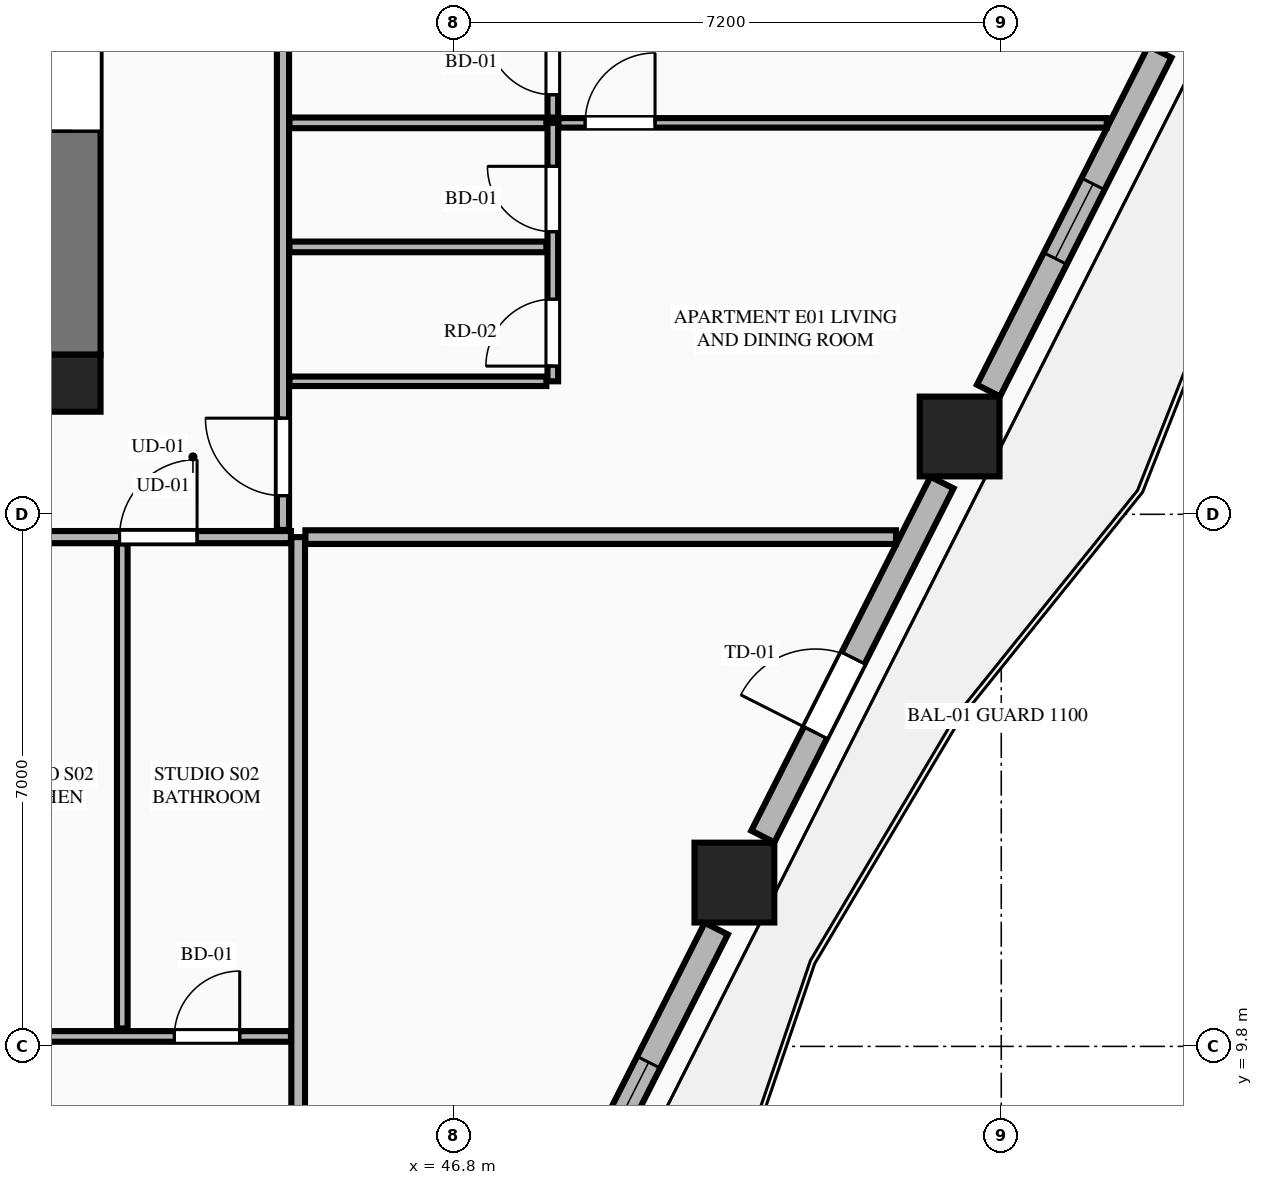
"""IFC4 building model, lengths in metres.
Left out: names, types, materials, properties, quantities, classifications, styles, units other than length and angle.
Written with IfcOpenShell. Run it as: python <this file> out.ifc"""

import sys

from ifc_helpers import new_model, si_unit, direction, frame, frame_2d, origin, origin_2d, place, context, subcontext, project, spatial, rectangle, extrude, element, fill, save


model = new_model("IFC4")
c1 = context("Model", 3, precision=1e-05, world=origin(), true_north=direction((0.0, 1.0)))
c2 = subcontext(c1, "Body", "Model", "MODEL_VIEW")
j1 = project(units=[si_unit("LENGTHUNIT", "METRE"), si_unit("PLANEANGLEUNIT", "RADIAN")], contexts=[c1])
p1 = place(None, origin())
s1 = spatial("IfcSite", under=j1, at=p1, CompositionType="ELEMENT")
p2 = place(p1, origin())
s2 = spatial("IfcBuilding", under=s1, at=p2, CompositionType="ELEMENT")
p3 = place(p2, frame((0.0, 0.0, 101.95)))
s3 = spatial("IfcBuildingStorey", under=s2, at=p3, CompositionType="ELEMENT", Elevation=101.95)
p4 = place(p3, frame((41.775, 18.525, 0.0), z_axis=(0.0, 0.0, 1.0), x_axis=(1.0, 0.0, 0.0)))
e1 = element("IfcColumn", 1, at=p4, inside=s3, PredefinedType="COLUMN", context=c2, shape_type="SweptSolid", body=[
    extrude(rectangle(XDim=0.75, YDim=0.75, at=origin_2d()), origin(), (0.0, 0.0, 1.0), 3.55),
])
p5 = place(p3, frame((41.775, 18.9, 0.0), z_axis=(0.0, 0.0, 1.0), x_axis=(0.0, 1.0, 0.0)))
e2 = element("IfcWall", 2, at=p5, inside=s3, PredefinedType="SHEAR", context=c2, shape_type="SweptSolid", body=[
    extrude(rectangle(XDim=14.0, YDim=0.75, at=frame_2d((7.0, 0.0))), origin(), (0.0, 0.0, 1.0), 3.34),
])
p6 = place(p5, frame((2.94, 0.0, 0.0)))
e3 = element("IfcOpeningElement", 3, at=p6, cuts=e2, PredefinedType="OPENING", context=c2, shape_type="SweptSolid", body=[
    extrude(rectangle(XDim=1.22, YDim=2.25, at=frame_2d((0.61, 1.125))), frame((0.0, 0.385, 0.0), z_axis=(0.0, -1.0, 0.0), x_axis=(1.0, 0.0, 0.0)), (0.0, 0.0, 1.0), 0.77),
])
for number, where, z_axis, x_axis in (
    (4, (50.489, 11.955, 0.0), (0.0, 0.0, 1.0), (1.0, 0.0, 0.0)),
    (5, (53.452, 17.824, 0.0), (0.0, 0.0, 1.0), (1.0, 0.0, 0.0)),
):
    element("IfcColumn", number, at=place(p3, frame(where, z_axis=z_axis, x_axis=x_axis)), inside=s3, PredefinedType="COLUMN", context=c2, shape_type="SweptSolid", body=[
        extrude(rectangle(XDim=1.05, YDim=1.05, at=origin_2d()), origin(), (0.0, 0.0, 1.0), 3.55),
    ])
p7 = place(p3, frame((47.975, 6.852, 0.0), z_axis=(0.0, 0.0, 1.0), x_axis=(0.451548465867, 0.892246593142, 0.0)))
e6 = element("IfcWall", 6, at=p7, inside=s3, PredefinedType="STANDARD", context=c2, shape_type="SweptSolid", body=[
    extrude(rectangle(XDim=5.04, YDim=0.34, at=frame_2d((2.52, 0.0))), origin(), (0.0, 0.0, 1.0), 2.797),
])
p8 = place(p7, frame((1.97, 0.0, 0.75)))
e7 = element("IfcOpeningElement", 7, at=p8, cuts=e6, PredefinedType="OPENING", context=c2, shape_type="SweptSolid", body=[
    extrude(rectangle(XDim=1.1, YDim=1.897, at=frame_2d((0.55, 0.948))), frame((0.0, 0.18, 0.0), z_axis=(0.0, -1.0, 0.0), x_axis=(1.0, 0.0, 0.0)), (0.0, 0.0, 1.0), 0.36),
])
p9 = place(p3, frame((50.863, 12.561, 0.0), z_axis=(0.0, 0.0, 1.0), x_axis=(0.451567731634, 0.892236842855, 0.0)))
e8 = element("IfcWall", 8, at=p9, inside=s3, PredefinedType="STANDARD", context=c2, shape_type="SweptSolid", body=[
    extrude(rectangle(XDim=5.219, YDim=0.34, at=frame_2d((2.61, 0.0))), origin(), (0.0, 0.0, 1.0), 2.797),
])
p10 = place(p9, frame((1.532, 0.0, 0.0)))
e9 = element("IfcOpeningElement", 9, at=p10, cuts=e8, PredefinedType="OPENING", context=c2, shape_type="SweptSolid", body=[
    extrude(rectangle(XDim=1.1, YDim=2.25, at=frame_2d((0.55, 1.125))), frame((0.0, 0.18, 0.0), z_axis=(0.0, -1.0, 0.0), x_axis=(1.0, 0.0, 0.0)), (0.0, 0.0, 1.0), 0.36),
])
p11 = place(p3, frame((53.832, 18.428, 0.0), z_axis=(0.0, 0.0, 1.0), x_axis=(0.451431617681, 0.892305718102, 0.0)))
e10 = element("IfcWall", 10, at=p11, inside=s3, PredefinedType="STANDARD", context=c2, shape_type="SweptSolid", body=[
    extrude(rectangle(XDim=4.995, YDim=0.34, at=frame_2d((2.498, 0.0))), origin(), (0.0, 0.0, 1.0), 2.797),
])
p12 = place(p11, frame((1.947, 0.0, 0.75)))
e11 = element("IfcOpeningElement", 11, at=p12, cuts=e10, PredefinedType="OPENING", context=c2, shape_type="SweptSolid", body=[
    extrude(rectangle(XDim=1.1, YDim=1.897, at=frame_2d((0.55, 0.948))), frame((0.0, 0.18, 0.0), z_axis=(0.0, -1.0, 0.0), x_axis=(1.0, 0.0, 0.0)), (0.0, 0.0, 1.0), 0.36),
])
p13 = place(p3, frame((44.75, 4.105, 0.0), z_axis=(0.0, 0.0, 1.0), x_axis=(0.0, 1.0, 0.0)))
e12 = element("IfcWall", 12, at=p13, inside=s3, PredefinedType="PARTITIONING", context=c2, shape_type="SweptSolid", body=[
    extrude(rectangle(XDim=12.395, YDim=0.18, at=frame_2d((6.198, 0.0))), origin(), (0.0, 0.0, 1.0), 3.34),
])
p14 = place(p3, frame((36.327, 16.5, 0.0), z_axis=(0.0, 0.0, 1.0), x_axis=(1.0, 0.0, 0.0)))
e13 = element("IfcWall", 13, at=p14, inside=s3, PredefinedType="PARTITIONING", context=c2, shape_type="SweptSolid", body=[
    extrude(rectangle(XDim=8.328, YDim=0.16, at=frame_2d((4.164, 0.0))), origin(), (0.0, 0.0, 1.0), 3.34),
])
p15 = place(p14, frame((6.073, 0.0, 0.0)))
e14 = element("IfcOpeningElement", 14, at=p15, cuts=e13, PredefinedType="OPENING", context=c2, shape_type="SweptSolid", body=[
    extrude(rectangle(XDim=1.02, YDim=2.25, at=frame_2d((0.51, 1.125))), frame((0.0, 0.09, 0.0), z_axis=(0.0, -1.0, 0.0), x_axis=(1.0, 0.0, 0.0)), (0.0, 0.0, 1.0), 0.18),
])
p16 = place(p3, frame((40.3, 9.931, 0.0), z_axis=(0.0, 0.0, 1.0), x_axis=(1.0, 0.0, 0.0)))
e15 = element("IfcWall", 15, at=p16, inside=s3, PredefinedType="PLUMBINGWALL", context=c2, shape_type="SweptSolid", body=[
    extrude(rectangle(XDim=4.355, YDim=0.14, at=frame_2d((2.177, 0.0))), origin(), (0.0, 0.0, 1.0), 3.34),
])
p17 = place(p16, frame((2.821, 0.0, 0.0)))
e16 = element("IfcOpeningElement", 16, at=p17, cuts=e15, PredefinedType="OPENING", context=c2, shape_type="SweptSolid", body=[
    extrude(rectangle(XDim=0.86, YDim=2.1, at=frame_2d((0.43, 1.05))), frame((0.0, 0.08, 0.0), z_axis=(0.0, -1.0, 0.0), x_axis=(1.0, 0.0, 0.0)), (0.0, 0.0, 1.0), 0.16),
])
p18 = place(p16, frame((0.22, 0.0, 0.0)))
e17 = element("IfcOpeningElement", 17, at=p18, cuts=e15, PredefinedType="OPENING", context=c2, shape_type="SweptSolid", body=[
    extrude(rectangle(XDim=0.88, YDim=2.15, at=frame_2d((0.44, 1.075))), frame((0.0, 0.08, 0.0), z_axis=(0.0, -1.0, 0.0), x_axis=(1.0, 0.0, 0.0)), (0.0, 0.0, 1.0), 0.16),
])
p19 = place(p3, frame((42.436, 10.036, 0.0), z_axis=(0.0, 0.0, 1.0), x_axis=(0.0, 1.0, 0.0)))
e18 = element("IfcWall", 18, at=p19, inside=s3, PredefinedType="PLUMBINGWALL", context=c2, shape_type="SweptSolid", body=[
    extrude(rectangle(XDim=6.379, YDim=0.14, at=frame_2d((3.189, 0.0))), origin(), (0.0, 0.0, 1.0), 2.722),
])
p20 = place(p3, frame((44.845, 16.5, 0.0), z_axis=(0.0, 0.0, 1.0), x_axis=(1.0, 0.0, 0.0)))
e19 = element("IfcWall", 19, at=p20, inside=s3, PredefinedType="PARTITIONING", context=c2, shape_type="SweptSolid", body=[
    extrude(rectangle(XDim=7.77, YDim=0.18, at=frame_2d((3.885, 0.0))), origin(), (0.0, 0.0, 1.0), 3.34),
])
p21 = place(p3, frame((44.55, 16.595, 0.0), z_axis=(0.0, 0.0, 1.0), x_axis=(0.0, 1.0, 0.0)))
e20 = element("IfcWall", 20, at=p21, inside=s3, PredefinedType="PARTITIONING", context=c2, shape_type="SweptSolid", body=[
    extrude(rectangle(XDim=9.586, YDim=0.16, at=frame_2d((4.793, 0.0))), origin(), (0.0, 0.0, 1.0), 3.34),
])
p22 = place(p21, frame((0.45, 0.0, 0.0)))
e21 = element("IfcOpeningElement", 21, at=p22, cuts=e20, PredefinedType="OPENING", context=c2, shape_type="SweptSolid", body=[
    extrude(rectangle(XDim=1.02, YDim=2.25, at=frame_2d((0.51, 1.125))), frame((0.0, 0.09, 0.0), z_axis=(0.0, -1.0, 0.0), x_axis=(1.0, 0.0, 0.0)), (0.0, 0.0, 1.0), 0.18),
])
p23 = place(p3, frame((44.635, 18.55, 0.0), z_axis=(0.0, 0.0, 1.0), x_axis=(1.0, 0.0, 0.0)))
e22 = element("IfcWall", 22, at=p23, inside=s3, PredefinedType="PARTITIONING", context=c2, shape_type="SweptSolid", body=[
    extrude(rectangle(XDim=3.38, YDim=0.125, at=frame_2d((1.69, 0.0))), origin(), (0.0, 0.0, 1.0), 2.722),
])
p24 = place(p3, frame((48.1, 18.55, 0.0), z_axis=(0.0, 0.0, 1.0), x_axis=(0.0, 1.0, 0.0)))
e23 = element("IfcWall", 23, at=p24, inside=s3, PredefinedType="PLUMBINGWALL", context=c2, shape_type="SweptSolid", body=[
    extrude(rectangle(XDim=3.4, YDim=0.14, at=frame_2d((1.7, 0.0))), origin(), (0.0, 0.0, 1.0), 3.34),
])
p25 = place(p24, frame((0.2, 0.0, 0.0)))
e24 = element("IfcOpeningElement", 24, at=p25, cuts=e23, PredefinedType="OPENING", context=c2, shape_type="SweptSolid", body=[
    extrude(rectangle(XDim=0.88, YDim=2.15, at=frame_2d((0.44, 1.075))), frame((0.0, 0.08, 0.0), z_axis=(0.0, -1.0, 0.0), x_axis=(1.0, 0.0, 0.0)), (0.0, 0.0, 1.0), 0.16),
])
p26 = place(p24, frame((1.968, 0.0, 0.0)))
e25 = element("IfcOpeningElement", 25, at=p26, cuts=e23, PredefinedType="OPENING", context=c2, shape_type="SweptSolid", body=[
    extrude(rectangle(XDim=0.86, YDim=2.1, at=frame_2d((0.43, 1.05))), frame((0.0, 0.08, 0.0), z_axis=(0.0, -1.0, 0.0), x_axis=(1.0, 0.0, 0.0)), (0.0, 0.0, 1.0), 0.16),
])
p27 = place(p3, frame((48.1, 22.02, 0.0), z_axis=(0.0, 0.0, 1.0), x_axis=(0.0, 1.0, 0.0)))
e26 = element("IfcWall", 26, at=p27, inside=s3, PredefinedType="PLUMBINGWALL", context=c2, shape_type="SweptSolid", body=[
    extrude(rectangle(XDim=4.161, YDim=0.14, at=frame_2d((2.081, 0.0))), origin(), (0.0, 0.0, 1.0), 3.34),
])
p28 = place(p27, frame((0.3, 0.0, 0.0)))
e27 = element("IfcOpeningElement", 27, at=p28, cuts=e26, PredefinedType="OPENING", context=c2, shape_type="SweptSolid", body=[
    extrude(rectangle(XDim=0.86, YDim=2.1, at=frame_2d((0.43, 1.05))), frame((0.0, 0.08, 0.0), z_axis=(0.0, -1.0, 0.0), x_axis=(1.0, 0.0, 0.0)), (0.0, 0.0, 1.0), 0.16),
])
p29 = place(p3, frame((44.635, 21.95, 0.0), z_axis=(0.0, 0.0, 1.0), x_axis=(1.0, 0.0, 0.0)))
e28 = element("IfcWall", 28, at=p29, inside=s3, PredefinedType="PLUMBINGWALL", context=c2, shape_type="SweptSolid", body=[
    extrude(rectangle(XDim=3.38, YDim=0.14, at=frame_2d((1.69, 0.0))), origin(), (0.0, 0.0, 1.0), 3.34),
])
p30 = place(p3, frame((48.175, 21.95, 0.0), z_axis=(0.0, 0.0, 1.0), x_axis=(1.0, 0.0, 0.0)))
e29 = element("IfcWall", 29, at=p30, inside=s3, PredefinedType="PARTITIONING", context=c2, shape_type="SweptSolid", body=[
    extrude(rectangle(XDim=7.213, YDim=0.125, at=frame_2d((3.606, 0.0))), origin(), (0.0, 0.0, 1.0), 3.34),
])
p31 = place(p30, frame((0.35, 0.0, 0.0)))
e30 = element("IfcOpeningElement", 30, at=p31, cuts=e29, PredefinedType="OPENING", context=c2, shape_type="SweptSolid", body=[
    extrude(rectangle(XDim=0.92, YDim=2.15, at=frame_2d((0.46, 1.075))), frame((0.0, 0.073, 0.0), z_axis=(0.0, -1.0, 0.0), x_axis=(1.0, 0.0, 0.0)), (0.0, 0.0, 1.0), 0.145),
])
p32 = place(p3, frame((44.635, 20.318, 0.0), z_axis=(0.0, 0.0, 1.0), x_axis=(1.0, 0.0, 0.0)))
e31 = element("IfcWall", 31, at=p32, inside=s3, PredefinedType="PLUMBINGWALL", context=c2, shape_type="SweptSolid", body=[
    extrude(rectangle(XDim=3.38, YDim=0.14, at=frame_2d((1.69, 0.0))), origin(), (0.0, 0.0, 1.0), 3.34),
])
p33 = place(p6, origin())
e32 = element("IfcDoor", 32, at=p33, inside=s3, OperationType="SINGLE_SWING_LEFT", PredefinedType="DOOR", context=c2, shape_type="SweptSolid", body=[
    extrude(rectangle(XDim=1.22, YDim=2.25, at=frame_2d((0.61, 1.125))), frame((0.0, 0.025, 0.0), z_axis=(0.0, -1.0, 0.0), x_axis=(1.0, 0.0, 0.0)), (0.0, 0.0, 1.0), 0.05),
])
fill(e3, e32)
p34 = place(p8, origin())
e33 = element("IfcWindow", 33, at=p34, inside=s3, PartitioningType="SINGLE_PANEL", PredefinedType="WINDOW", context=c2, shape_type="SweptSolid", body=[
    extrude(rectangle(XDim=1.1, YDim=1.897, at=frame_2d((0.55, 0.948))), frame((0.0, 0.03, 0.0), z_axis=(0.0, -1.0, 0.0), x_axis=(1.0, 0.0, 0.0)), (0.0, 0.0, 1.0), 0.06),
])
fill(e7, e33)
p35 = place(p10, origin())
e34 = element("IfcDoor", 34, at=p35, inside=s3, OperationType="SINGLE_SWING_LEFT", PredefinedType="DOOR", context=c2, shape_type="SweptSolid", body=[
    extrude(rectangle(XDim=1.1, YDim=2.25, at=frame_2d((0.55, 1.125))), frame((0.0, 0.025, 0.0), z_axis=(0.0, -1.0, 0.0), x_axis=(1.0, 0.0, 0.0)), (0.0, 0.0, 1.0), 0.05),
])
fill(e9, e34)
p36 = place(p12, origin())
e35 = element("IfcWindow", 35, at=p36, inside=s3, PartitioningType="SINGLE_PANEL", PredefinedType="WINDOW", context=c2, shape_type="SweptSolid", body=[
    extrude(rectangle(XDim=1.1, YDim=1.897, at=frame_2d((0.55, 0.948))), frame((0.0, 0.03, 0.0), z_axis=(0.0, -1.0, 0.0), x_axis=(1.0, 0.0, 0.0)), (0.0, 0.0, 1.0), 0.06),
])
fill(e11, e35)
p37 = place(p17, origin())
e36 = element("IfcDoor", 36, at=p37, inside=s3, OperationType="SINGLE_SWING_RIGHT", PredefinedType="DOOR", context=c2, shape_type="SweptSolid", body=[
    extrude(rectangle(XDim=0.86, YDim=2.1, at=frame_2d((0.43, 1.05))), frame((0.0, 0.025, 0.0), z_axis=(0.0, -1.0, 0.0), x_axis=(1.0, 0.0, 0.0)), (0.0, 0.0, 1.0), 0.05),
])
fill(e16, e36)
p38 = place(p15, origin())
e37 = element("IfcDoor", 37, at=p38, inside=s3, OperationType="SINGLE_SWING_RIGHT", PredefinedType="DOOR", context=c2, shape_type="SweptSolid", body=[
    extrude(rectangle(XDim=1.02, YDim=2.25, at=frame_2d((0.51, 1.125))), frame((0.0, 0.025, 0.0), z_axis=(0.0, -1.0, 0.0), x_axis=(1.0, 0.0, 0.0)), (0.0, 0.0, 1.0), 0.05),
])
fill(e14, e37)
p39 = place(p25, origin())
e38 = element("IfcDoor", 38, at=p39, inside=s3, OperationType="SINGLE_SWING_LEFT", PredefinedType="DOOR", context=c2, shape_type="SweptSolid", body=[
    extrude(rectangle(XDim=0.88, YDim=2.15, at=frame_2d((0.44, 1.075))), frame((0.0, 0.025, 0.0), z_axis=(0.0, -1.0, 0.0), x_axis=(1.0, 0.0, 0.0)), (0.0, 0.0, 1.0), 0.05),
])
fill(e24, e38)
p40 = place(p26, origin())
e39 = element("IfcDoor", 39, at=p40, inside=s3, OperationType="SINGLE_SWING_RIGHT", PredefinedType="DOOR", context=c2, shape_type="SweptSolid", body=[
    extrude(rectangle(XDim=0.86, YDim=2.1, at=frame_2d((0.43, 1.05))), frame((0.0, 0.025, 0.0), z_axis=(0.0, -1.0, 0.0), x_axis=(1.0, 0.0, 0.0)), (0.0, 0.0, 1.0), 0.05),
])
fill(e25, e39)
p41 = place(p28, origin())
e40 = element("IfcDoor", 40, at=p41, inside=s3, OperationType="SINGLE_SWING_RIGHT", PredefinedType="DOOR", context=c2, shape_type="SweptSolid", body=[
    extrude(rectangle(XDim=0.86, YDim=2.1, at=frame_2d((0.43, 1.05))), frame((0.0, 0.025, 0.0), z_axis=(0.0, -1.0, 0.0), x_axis=(1.0, 0.0, 0.0)), (0.0, 0.0, 1.0), 0.05),
])
fill(e27, e40)
p42 = place(p22, origin())
e41 = element("IfcDoor", 41, at=p42, inside=s3, OperationType="SINGLE_SWING_RIGHT", PredefinedType="DOOR", context=c2, shape_type="SweptSolid", body=[
    extrude(rectangle(XDim=1.02, YDim=2.25, at=frame_2d((0.51, 1.125))), frame((0.0, 0.025, 0.0), z_axis=(0.0, -1.0, 0.0), x_axis=(1.0, 0.0, 0.0)), (0.0, 0.0, 1.0), 0.05),
])
fill(e21, e41)
p43 = place(p31, origin())
e42 = element("IfcDoor", 42, at=p43, inside=s3, OperationType="SINGLE_SWING_RIGHT", PredefinedType="DOOR", context=c2, shape_type="SweptSolid", body=[
    extrude(rectangle(XDim=0.92, YDim=2.15, at=frame_2d((0.46, 1.075))), frame((0.0, 0.025, 0.0), z_axis=(0.0, -1.0, 0.0), x_axis=(1.0, 0.0, 0.0)), (0.0, 0.0, 1.0), 0.05),
])
fill(e30, e42)
save(model, sys.argv[1])
